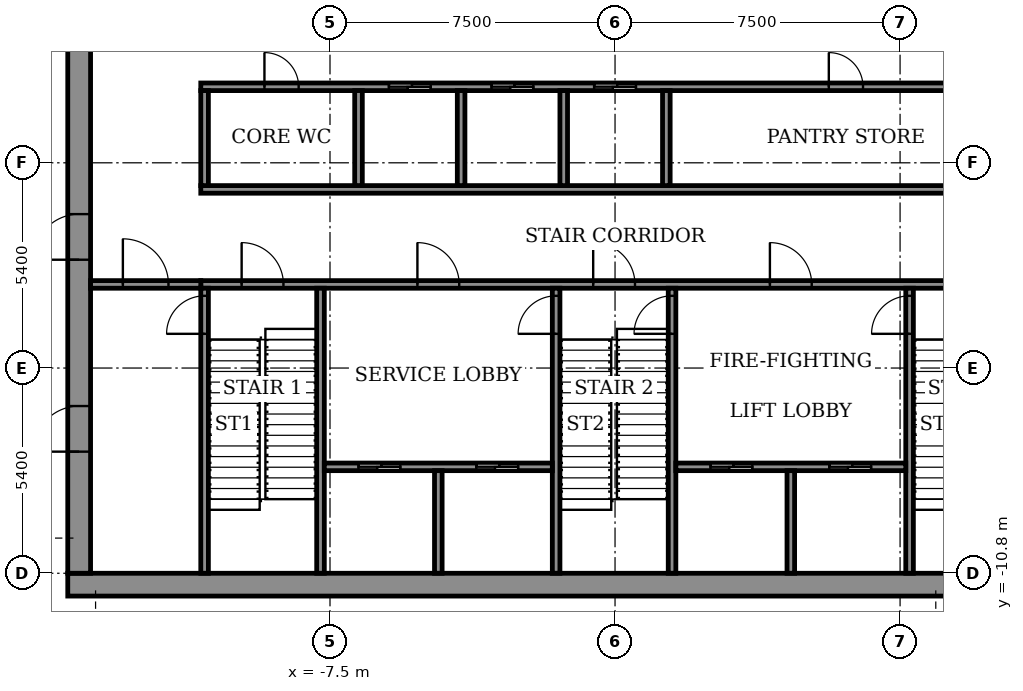
"""IFC4 building model, lengths in metres.
Left out: names, types, materials, properties, quantities, classifications, styles, units other than length and angle.
Written with IfcOpenShell. Run it as: python <this file> out.ifc"""

import sys

from ifc_helpers import new_model, si_unit, direction, frame, frame_2d, origin, place, context, subcontext, project, spatial, rectangle, extrude, element, fill, save


model = new_model("IFC4")
c1 = context("Model", 3, precision=1e-05, world=origin(), true_north=direction((0.0, 1.0)))
c2 = subcontext(c1, "Body", "Model", "MODEL_VIEW")
j1 = project(units=[si_unit("LENGTHUNIT", "METRE"), si_unit("PLANEANGLEUNIT", "RADIAN")], contexts=[c1])
p1 = place(None, origin())
s1 = spatial("IfcSite", under=j1, at=p1, CompositionType="ELEMENT")
p2 = place(p1, origin())
s2 = spatial("IfcBuilding", under=s1, at=p2, CompositionType="ELEMENT")
p3 = place(p2, frame((0.0, 0.0, 324.1)))
s3 = spatial("IfcBuildingStorey", under=s2, at=p3, CompositionType="ELEMENT", Elevation=324.1)
p4 = place(p3, frame((-14.4, -11.1, 0.0), z_axis=(0.0, 0.0, 1.0), x_axis=(1.0, 0.0, 0.0)))
e1 = element("IfcWall", 1, at=p4, inside=s3, PredefinedType="SHEAR", context=c2, shape_type="SweptSolid", body=[
    extrude(rectangle(XDim=28.8, YDim=0.6, at=frame_2d((14.4, 0.0))), origin(), (0.0, 0.0, 1.0), 5.6),
])
p5 = place(p3, frame((-14.1, -10.8, 0.0), z_axis=(0.0, 0.0, 1.0), x_axis=(0.0, 1.0, 0.0)))
e2 = element("IfcWall", 2, at=p5, inside=s3, PredefinedType="SHEAR", context=c2, shape_type="SweptSolid", body=[
    extrude(rectangle(XDim=21.6, YDim=0.6, at=frame_2d((10.8, 0.0))), origin(), (0.0, 0.0, 1.0), 5.6),
])
p6 = place(p5, frame((8.25, 0.0, 0.0)))
e3 = element("IfcOpeningElement", 3, at=p6, cuts=e2, PredefinedType="OPENING", context=c2, shape_type="SweptSolid", body=[
    extrude(rectangle(XDim=1.2, YDim=2.1, at=frame_2d((0.6, 1.05))), frame((0.0, 0.31, 0.0), z_axis=(0.0, -1.0, 0.0), x_axis=(1.0, 0.0, 0.0)), (0.0, 0.0, 1.0), 0.62),
])
p7 = place(p5, frame((15.25, 0.0, 0.0)))
e4 = element("IfcOpeningElement", 4, at=p7, cuts=e2, PredefinedType="OPENING", context=c2, shape_type="SweptSolid", body=[
    extrude(rectangle(XDim=1.2, YDim=2.1, at=frame_2d((0.6, 1.05))), frame((0.0, 0.31, 0.0), z_axis=(0.0, -1.0, 0.0), x_axis=(1.0, 0.0, 0.0)), (0.0, 0.0, 1.0), 0.62),
])
p8 = place(p5, frame((3.2, 0.0, 0.0)))
e5 = element("IfcOpeningElement", 5, at=p8, cuts=e2, PredefinedType="OPENING", context=c2, shape_type="SweptSolid", body=[
    extrude(rectangle(XDim=1.2, YDim=2.1, at=frame_2d((0.6, 1.05))), frame((0.0, 0.31, 0.0), z_axis=(0.0, -1.0, 0.0), x_axis=(1.0, 0.0, 0.0)), (0.0, 0.0, 1.0), 0.62),
])
p9 = place(p3, frame((-10.9, -3.2, 0.0), z_axis=(0.0, 0.0, 1.0), x_axis=(1.0, 0.0, 0.0)))
e6 = element("IfcWall", 6, at=p9, inside=s3, PredefinedType="SHEAR", context=c2, shape_type="SweptSolid", body=[
    extrude(rectangle(XDim=21.8, YDim=0.2, at=frame_2d((10.9, 0.0))), origin(), (0.0, 0.0, 1.0), 5.05),
])
p10 = place(p9, frame((1.075, 0.0, 0.0)))
e7 = element("IfcOpeningElement", 7, at=p10, cuts=e6, PredefinedType="OPENING", context=c2, shape_type="SweptSolid", body=[
    extrude(rectangle(XDim=1.1, YDim=2.1, at=frame_2d((0.55, 1.05))), frame((0.0, 0.11, 0.0), z_axis=(0.0, -1.0, 0.0), x_axis=(1.0, 0.0, 0.0)), (0.0, 0.0, 1.0), 0.22),
])
p11 = place(p9, frame((10.325, 0.0, 0.0)))
e8 = element("IfcOpeningElement", 8, at=p11, cuts=e6, PredefinedType="OPENING", context=c2, shape_type="SweptSolid", body=[
    extrude(rectangle(XDim=1.1, YDim=2.1, at=frame_2d((0.55, 1.05))), frame((0.0, 0.11, 0.0), z_axis=(0.0, -1.0, 0.0), x_axis=(1.0, 0.0, 0.0)), (0.0, 0.0, 1.0), 0.22),
])
p12 = place(p9, frame((19.625, 0.0, 0.0)))
e9 = element("IfcOpeningElement", 9, at=p12, cuts=e6, PredefinedType="OPENING", context=c2, shape_type="SweptSolid", body=[
    extrude(rectangle(XDim=1.1, YDim=2.1, at=frame_2d((0.55, 1.05))), frame((0.0, 0.11, 0.0), z_axis=(0.0, -1.0, 0.0), x_axis=(1.0, 0.0, 0.0)), (0.0, 0.0, 1.0), 0.22),
])
p13 = place(p9, frame((5.7, 0.0, 0.0)))
e10 = element("IfcOpeningElement", 10, at=p13, cuts=e6, PredefinedType="OPENING", context=c2, shape_type="SweptSolid", body=[
    extrude(rectangle(XDim=1.1, YDim=2.1, at=frame_2d((0.55, 1.05))), frame((0.0, 0.11, 0.0), z_axis=(0.0, -1.0, 0.0), x_axis=(1.0, 0.0, 0.0)), (0.0, 0.0, 1.0), 0.22),
])
p14 = place(p9, frame((14.975, 0.0, 0.0)))
e11 = element("IfcOpeningElement", 11, at=p14, cuts=e6, PredefinedType="OPENING", context=c2, shape_type="SweptSolid", body=[
    extrude(rectangle(XDim=1.1, YDim=2.1, at=frame_2d((0.55, 1.05))), frame((0.0, 0.11, 0.0), z_axis=(0.0, -1.0, 0.0), x_axis=(1.0, 0.0, 0.0)), (0.0, 0.0, 1.0), 0.22),
])
p15 = place(p3, frame((-10.9, -0.7, 0.0), z_axis=(0.0, 0.0, 1.0), x_axis=(1.0, 0.0, 0.0)))
e12 = element("IfcWall", 12, at=p15, inside=s3, PredefinedType="SHEAR", context=c2, shape_type="SweptSolid", body=[
    extrude(rectangle(XDim=21.8, YDim=0.2, at=frame_2d((10.9, 0.0))), origin(), (0.0, 0.0, 1.0), 5.05),
])
p16 = place(p3, frame((-10.9, 2.0, 0.0), z_axis=(0.0, 0.0, 1.0), x_axis=(1.0, 0.0, 0.0)))
e13 = element("IfcWall", 13, at=p16, inside=s3, PredefinedType="SHEAR", context=c2, shape_type="SweptSolid", body=[
    extrude(rectangle(XDim=21.8, YDim=0.2, at=frame_2d((10.9, 0.0))), origin(), (0.0, 0.0, 1.0), 5.05),
])
p17 = place(p16, frame((4.95, 0.0, 0.0)))
e14 = element("IfcOpeningElement", 14, at=p17, cuts=e13, PredefinedType="OPENING", context=c2, shape_type="SweptSolid", body=[
    extrude(rectangle(XDim=1.1, YDim=2.1, at=frame_2d((0.55, 1.05))), frame((0.0, 0.11, 0.0), z_axis=(0.0, -1.0, 0.0), x_axis=(1.0, 0.0, 0.0)), (0.0, 0.0, 1.0), 0.22),
])
p18 = place(p16, frame((7.65, 0.0, 0.0)))
e15 = element("IfcOpeningElement", 15, at=p18, cuts=e13, PredefinedType="OPENING", context=c2, shape_type="SweptSolid", body=[
    extrude(rectangle(XDim=1.1, YDim=2.1, at=frame_2d((0.55, 1.05))), frame((0.0, 0.11, 0.0), z_axis=(0.0, -1.0, 0.0), x_axis=(1.0, 0.0, 0.0)), (0.0, 0.0, 1.0), 0.22),
])
p19 = place(p16, frame((10.35, 0.0, 0.0)))
e16 = element("IfcOpeningElement", 16, at=p19, cuts=e13, PredefinedType="OPENING", context=c2, shape_type="SweptSolid", body=[
    extrude(rectangle(XDim=1.1, YDim=2.1, at=frame_2d((0.55, 1.05))), frame((0.0, 0.11, 0.0), z_axis=(0.0, -1.0, 0.0), x_axis=(1.0, 0.0, 0.0)), (0.0, 0.0, 1.0), 0.22),
])
p20 = place(p16, frame((1.675, 0.0, 0.0)))
e17 = element("IfcOpeningElement", 17, at=p20, cuts=e13, PredefinedType="OPENING", context=c2, shape_type="SweptSolid", body=[
    extrude(rectangle(XDim=0.9, YDim=2.1, at=frame_2d((0.45, 1.05))), frame((0.0, 0.11, 0.0), z_axis=(0.0, -1.0, 0.0), x_axis=(1.0, 0.0, 0.0)), (0.0, 0.0, 1.0), 0.22),
])
p21 = place(p16, frame((16.525, 0.0, 0.0)))
e18 = element("IfcOpeningElement", 18, at=p21, cuts=e13, PredefinedType="OPENING", context=c2, shape_type="SweptSolid", body=[
    extrude(rectangle(XDim=0.9, YDim=2.1, at=frame_2d((0.45, 1.05))), frame((0.0, 0.11, 0.0), z_axis=(0.0, -1.0, 0.0), x_axis=(1.0, 0.0, 0.0)), (0.0, 0.0, 1.0), 0.22),
])
p22 = place(p3, frame((-10.8, -10.8, 0.0), z_axis=(0.0, 0.0, 1.0), x_axis=(0.0, 1.0, 0.0)))
e19 = element("IfcWall", 19, at=p22, inside=s3, PredefinedType="SHEAR", context=c2, shape_type="SweptSolid", body=[
    extrude(rectangle(XDim=7.5, YDim=0.2, at=frame_2d((3.75, 0.0))), origin(), (0.0, 0.0, 1.0), 5.05),
])
p23 = place(p22, frame((6.3, 0.0, 0.0)))
e20 = element("IfcOpeningElement", 20, at=p23, cuts=e19, PredefinedType="OPENING", context=c2, shape_type="SweptSolid", body=[
    extrude(rectangle(XDim=1.0, YDim=2.1, at=frame_2d((0.5, 1.05))), frame((0.0, 0.11, 0.0), z_axis=(0.0, -1.0, 0.0), x_axis=(1.0, 0.0, 0.0)), (0.0, 0.0, 1.0), 0.22),
])
p24 = place(p3, frame((-7.75, -10.8, 0.0), z_axis=(0.0, 0.0, 1.0), x_axis=(0.0, 1.0, 0.0)))
e21 = element("IfcWall", 21, at=p24, inside=s3, PredefinedType="SHEAR", context=c2, shape_type="SweptSolid", body=[
    extrude(rectangle(XDim=7.5, YDim=0.2, at=frame_2d((3.75, 0.0))), origin(), (0.0, 0.0, 1.0), 5.05),
])
p25 = place(p3, frame((-1.55, -10.8, 0.0), z_axis=(0.0, 0.0, 1.0), x_axis=(0.0, 1.0, 0.0)))
e22 = element("IfcWall", 22, at=p25, inside=s3, PredefinedType="SHEAR", context=c2, shape_type="SweptSolid", body=[
    extrude(rectangle(XDim=7.5, YDim=0.2, at=frame_2d((3.75, 0.0))), origin(), (0.0, 0.0, 1.0), 5.05),
])
p26 = place(p25, frame((6.3, 0.0, 0.0)))
e23 = element("IfcOpeningElement", 23, at=p26, cuts=e22, PredefinedType="OPENING", context=c2, shape_type="SweptSolid", body=[
    extrude(rectangle(XDim=1.0, YDim=2.1, at=frame_2d((0.5, 1.05))), frame((0.0, 0.11, 0.0), z_axis=(0.0, -1.0, 0.0), x_axis=(1.0, 0.0, 0.0)), (0.0, 0.0, 1.0), 0.22),
])
p27 = place(p3, frame((1.5, -10.8, 0.0), z_axis=(0.0, 0.0, 1.0), x_axis=(0.0, 1.0, 0.0)))
e24 = element("IfcWall", 24, at=p27, inside=s3, PredefinedType="SHEAR", context=c2, shape_type="SweptSolid", body=[
    extrude(rectangle(XDim=7.5, YDim=0.2, at=frame_2d((3.75, 0.0))), origin(), (0.0, 0.0, 1.0), 5.05),
])
p28 = place(p27, frame((6.3, 0.0, 0.0)))
e25 = element("IfcOpeningElement", 25, at=p28, cuts=e24, PredefinedType="OPENING", context=c2, shape_type="SweptSolid", body=[
    extrude(rectangle(XDim=1.0, YDim=2.1, at=frame_2d((0.5, 1.05))), frame((0.0, 0.11, 0.0), z_axis=(0.0, -1.0, 0.0), x_axis=(1.0, 0.0, 0.0)), (0.0, 0.0, 1.0), 0.22),
])
p29 = place(p3, frame((7.75, -10.8, 0.0), z_axis=(0.0, 0.0, 1.0), x_axis=(0.0, 1.0, 0.0)))
e26 = element("IfcWall", 26, at=p29, inside=s3, PredefinedType="SHEAR", context=c2, shape_type="SweptSolid", body=[
    extrude(rectangle(XDim=7.5, YDim=0.2, at=frame_2d((3.75, 0.0))), origin(), (0.0, 0.0, 1.0), 5.05),
])
p30 = place(p29, frame((6.3, 0.0, 0.0)))
e27 = element("IfcOpeningElement", 27, at=p30, cuts=e26, PredefinedType="OPENING", context=c2, shape_type="SweptSolid", body=[
    extrude(rectangle(XDim=1.0, YDim=2.1, at=frame_2d((0.5, 1.05))), frame((0.0, 0.11, 0.0), z_axis=(0.0, -1.0, 0.0), x_axis=(1.0, 0.0, 0.0)), (0.0, 0.0, 1.0), 0.22),
])
p31 = place(p3, frame((-7.65, -8.0, 0.0), z_axis=(0.0, 0.0, 1.0), x_axis=(1.0, 0.0, 0.0)))
e28 = element("IfcWall", 28, at=p31, inside=s3, PredefinedType="SHEAR", context=c2, shape_type="SweptSolid", body=[
    extrude(rectangle(XDim=6.0, YDim=0.2, at=frame_2d((3.0, 0.0))), origin(), (0.0, 0.0, 1.0), 5.05),
])
p32 = place(p31, frame((0.9, 0.0, 0.0)))
e29 = element("IfcOpeningElement", 29, at=p32, cuts=e28, PredefinedType="OPENING", context=c2, shape_type="SweptSolid", body=[
    extrude(rectangle(XDim=1.1, YDim=2.1, at=frame_2d((0.55, 1.05))), frame((0.0, 0.11, 0.0), z_axis=(0.0, -1.0, 0.0), x_axis=(1.0, 0.0, 0.0)), (0.0, 0.0, 1.0), 0.22),
])
p33 = place(p31, frame((4.0, 0.0, 0.0)))
e30 = element("IfcOpeningElement", 30, at=p33, cuts=e28, PredefinedType="OPENING", context=c2, shape_type="SweptSolid", body=[
    extrude(rectangle(XDim=1.1, YDim=2.1, at=frame_2d((0.55, 1.05))), frame((0.0, 0.11, 0.0), z_axis=(0.0, -1.0, 0.0), x_axis=(1.0, 0.0, 0.0)), (0.0, 0.0, 1.0), 0.22),
])
p34 = place(p3, frame((-4.65, -10.8, 0.0), z_axis=(0.0, 0.0, 1.0), x_axis=(0.0, 1.0, 0.0)))
e31 = element("IfcWall", 31, at=p34, inside=s3, PredefinedType="SHEAR", context=c2, shape_type="SweptSolid", body=[
    extrude(rectangle(XDim=2.7, YDim=0.2, at=frame_2d((1.35, 0.0))), origin(), (0.0, 0.0, 1.0), 5.05),
])
p35 = place(p3, frame((1.6, -8.0, 0.0), z_axis=(0.0, 0.0, 1.0), x_axis=(1.0, 0.0, 0.0)))
e32 = element("IfcWall", 32, at=p35, inside=s3, PredefinedType="SHEAR", context=c2, shape_type="SweptSolid", body=[
    extrude(rectangle(XDim=6.05, YDim=0.2, at=frame_2d((3.025, 0.0))), origin(), (0.0, 0.0, 1.0), 5.05),
])
p36 = place(p35, frame((0.913, 0.0, 0.0)))
e33 = element("IfcOpeningElement", 33, at=p36, cuts=e32, PredefinedType="OPENING", context=c2, shape_type="SweptSolid", body=[
    extrude(rectangle(XDim=1.1, YDim=2.1, at=frame_2d((0.55, 1.05))), frame((0.0, 0.11, 0.0), z_axis=(0.0, -1.0, 0.0), x_axis=(1.0, 0.0, 0.0)), (0.0, 0.0, 1.0), 0.22),
])
p37 = place(p35, frame((4.038, 0.0, 0.0)))
e34 = element("IfcOpeningElement", 34, at=p37, cuts=e32, PredefinedType="OPENING", context=c2, shape_type="SweptSolid", body=[
    extrude(rectangle(XDim=1.1, YDim=2.1, at=frame_2d((0.55, 1.05))), frame((0.0, 0.11, 0.0), z_axis=(0.0, -1.0, 0.0), x_axis=(1.0, 0.0, 0.0)), (0.0, 0.0, 1.0), 0.22),
])
p38 = place(p3, frame((4.625, -10.8, 0.0), z_axis=(0.0, 0.0, 1.0), x_axis=(0.0, 1.0, 0.0)))
e35 = element("IfcWall", 35, at=p38, inside=s3, PredefinedType="SHEAR", context=c2, shape_type="SweptSolid", body=[
    extrude(rectangle(XDim=2.7, YDim=0.2, at=frame_2d((1.35, 0.0))), origin(), (0.0, 0.0, 1.0), 5.05),
])
p39 = place(p3, frame((-10.8, -0.6, 0.0), z_axis=(0.0, 0.0, 1.0), x_axis=(0.0, 1.0, 0.0)))
e36 = element("IfcWall", 36, at=p39, inside=s3, PredefinedType="STANDARD", context=c2, shape_type="SweptSolid", body=[
    extrude(rectangle(XDim=2.5, YDim=0.2, at=frame_2d((1.25, 0.0))), origin(), (0.0, 0.0, 1.0), 5.05),
])
for number, where, z_axis, x_axis in (
    (37, (-6.75, -0.6, 0.0), (0.0, 0.0, 1.0), (0.0, 1.0, 0.0)),
    (38, (-4.05, -0.6, 0.0), (0.0, 0.0, 1.0), (0.0, 1.0, 0.0)),
    (39, (-1.35, -0.6, 0.0), (0.0, 0.0, 1.0), (0.0, 1.0, 0.0)),
    (40, (1.35, -0.6, 0.0), (0.0, 0.0, 1.0), (0.0, 1.0, 0.0)),
):
    element("IfcWall", number, at=place(p3, frame(where, z_axis=z_axis, x_axis=x_axis)), inside=s3, PredefinedType="SHEAR", context=c2, shape_type="SweptSolid", body=[
        extrude(rectangle(XDim=2.5, YDim=0.2, at=frame_2d((1.25, 0.0))), origin(), (0.0, 0.0, 1.0), 5.05),
    ])
p40 = place(p3, frame((-13.8, -3.2, 0.0), z_axis=(0.0, 0.0, 1.0), x_axis=(1.0, 0.0, 0.0)))
e41 = element("IfcWall", 41, at=p40, inside=s3, PredefinedType="STANDARD", context=c2, shape_type="SweptSolid", body=[
    extrude(rectangle(XDim=2.9, YDim=0.2, at=frame_2d((1.45, 0.0))), origin(), (0.0, 0.0, 1.0), 5.05),
])
p41 = place(p40, frame((0.85, 0.0, 0.0)))
e42 = element("IfcOpeningElement", 42, at=p41, cuts=e41, PredefinedType="OPENING", context=c2, shape_type="SweptSolid", body=[
    extrude(rectangle(XDim=1.2, YDim=2.1, at=frame_2d((0.6, 1.05))), frame((0.0, 0.11, 0.0), z_axis=(0.0, -1.0, 0.0), x_axis=(1.0, 0.0, 0.0)), (0.0, 0.0, 1.0), 0.22),
])
p42 = place(p6, origin())
e43 = element("IfcDoor", 43, at=p42, inside=s3, OperationType="DOUBLE_DOOR_SINGLE_SWING", PredefinedType="DOOR", context=c2, shape_type="SweptSolid", body=[
    extrude(rectangle(XDim=1.2, YDim=2.1, at=frame_2d((0.6, 1.05))), frame((0.0, 0.025, 0.0), z_axis=(0.0, -1.0, 0.0), x_axis=(1.0, 0.0, 0.0)), (0.0, 0.0, 1.0), 0.05),
])
fill(e3, e43)
p43 = place(p8, origin())
e44 = element("IfcDoor", 44, at=p43, inside=s3, OperationType="DOUBLE_DOOR_SINGLE_SWING", PredefinedType="DOOR", context=c2, shape_type="SweptSolid", body=[
    extrude(rectangle(XDim=1.2, YDim=2.1, at=frame_2d((0.6, 1.05))), frame((0.0, 0.025, 0.0), z_axis=(0.0, -1.0, 0.0), x_axis=(1.0, 0.0, 0.0)), (0.0, 0.0, 1.0), 0.05),
])
fill(e5, e44)
p44 = place(p17, origin())
e45 = element("IfcDoor", 45, at=p44, inside=s3, OperationType="SLIDING_TO_LEFT", PredefinedType="DOOR", context=c2, shape_type="SweptSolid", body=[
    extrude(rectangle(XDim=1.1, YDim=2.1, at=frame_2d((0.55, 1.05))), frame((0.0, 0.025, 0.0), z_axis=(0.0, -1.0, 0.0), x_axis=(1.0, 0.0, 0.0)), (0.0, 0.0, 1.0), 0.05),
])
fill(e14, e45)
p45 = place(p18, origin())
e46 = element("IfcDoor", 46, at=p45, inside=s3, OperationType="SLIDING_TO_LEFT", PredefinedType="DOOR", context=c2, shape_type="SweptSolid", body=[
    extrude(rectangle(XDim=1.1, YDim=2.1, at=frame_2d((0.55, 1.05))), frame((0.0, 0.025, 0.0), z_axis=(0.0, -1.0, 0.0), x_axis=(1.0, 0.0, 0.0)), (0.0, 0.0, 1.0), 0.05),
])
fill(e15, e46)
p46 = place(p19, origin())
e47 = element("IfcDoor", 47, at=p46, inside=s3, OperationType="SLIDING_TO_LEFT", PredefinedType="DOOR", context=c2, shape_type="SweptSolid", body=[
    extrude(rectangle(XDim=1.1, YDim=2.1, at=frame_2d((0.55, 1.05))), frame((0.0, 0.025, 0.0), z_axis=(0.0, -1.0, 0.0), x_axis=(1.0, 0.0, 0.0)), (0.0, 0.0, 1.0), 0.05),
])
fill(e16, e47)
p47 = place(p20, origin())
e48 = element("IfcDoor", 48, at=p47, inside=s3, OperationType="SINGLE_SWING_RIGHT", PredefinedType="DOOR", context=c2, shape_type="SweptSolid", body=[
    extrude(rectangle(XDim=0.9, YDim=2.1, at=frame_2d((0.45, 1.05))), frame((0.0, 0.025, 0.0), z_axis=(0.0, -1.0, 0.0), x_axis=(1.0, 0.0, 0.0)), (0.0, 0.0, 1.0), 0.05),
])
fill(e17, e48)
p48 = place(p21, origin())
e49 = element("IfcDoor", 49, at=p48, inside=s3, OperationType="SINGLE_SWING_RIGHT", PredefinedType="DOOR", context=c2, shape_type="SweptSolid", body=[
    extrude(rectangle(XDim=0.9, YDim=2.1, at=frame_2d((0.45, 1.05))), frame((0.0, 0.025, 0.0), z_axis=(0.0, -1.0, 0.0), x_axis=(1.0, 0.0, 0.0)), (0.0, 0.0, 1.0), 0.05),
])
fill(e18, e49)
p49 = place(p36, origin())
e50 = element("IfcDoor", 50, at=p49, inside=s3, OperationType="SLIDING_TO_LEFT", PredefinedType="DOOR", context=c2, shape_type="SweptSolid", body=[
    extrude(rectangle(XDim=1.1, YDim=2.1, at=frame_2d((0.55, 1.05))), frame((0.0, 0.025, 0.0), z_axis=(0.0, -1.0, 0.0), x_axis=(1.0, 0.0, 0.0)), (0.0, 0.0, 1.0), 0.05),
])
fill(e33, e50)
p50 = place(p32, origin())
e51 = element("IfcDoor", 51, at=p50, inside=s3, OperationType="SLIDING_TO_LEFT", PredefinedType="DOOR", context=c2, shape_type="SweptSolid", body=[
    extrude(rectangle(XDim=1.1, YDim=2.1, at=frame_2d((0.55, 1.05))), frame((0.0, 0.025, 0.0), z_axis=(0.0, -1.0, 0.0), x_axis=(1.0, 0.0, 0.0)), (0.0, 0.0, 1.0), 0.05),
])
fill(e29, e51)
p51 = place(p37, origin())
e52 = element("IfcDoor", 52, at=p51, inside=s3, OperationType="SLIDING_TO_LEFT", PredefinedType="DOOR", context=c2, shape_type="SweptSolid", body=[
    extrude(rectangle(XDim=1.1, YDim=2.1, at=frame_2d((0.55, 1.05))), frame((0.0, 0.025, 0.0), z_axis=(0.0, -1.0, 0.0), x_axis=(1.0, 0.0, 0.0)), (0.0, 0.0, 1.0), 0.05),
])
fill(e34, e52)
p52 = place(p33, origin())
e53 = element("IfcDoor", 53, at=p52, inside=s3, OperationType="SLIDING_TO_LEFT", PredefinedType="DOOR", context=c2, shape_type="SweptSolid", body=[
    extrude(rectangle(XDim=1.1, YDim=2.1, at=frame_2d((0.55, 1.05))), frame((0.0, 0.025, 0.0), z_axis=(0.0, -1.0, 0.0), x_axis=(1.0, 0.0, 0.0)), (0.0, 0.0, 1.0), 0.05),
])
fill(e30, e53)
p53 = place(p10, origin())
e54 = element("IfcDoor", 54, at=p53, inside=s3, OperationType="SINGLE_SWING_RIGHT", PredefinedType="DOOR", context=c2, shape_type="SweptSolid", body=[
    extrude(rectangle(XDim=1.1, YDim=2.1, at=frame_2d((0.55, 1.05))), frame((0.0, 0.025, 0.0), z_axis=(0.0, -1.0, 0.0), x_axis=(1.0, 0.0, 0.0)), (0.0, 0.0, 1.0), 0.05),
])
fill(e7, e54)
p54 = place(p11, origin())
e55 = element("IfcDoor", 55, at=p54, inside=s3, OperationType="SINGLE_SWING_RIGHT", PredefinedType="DOOR", context=c2, shape_type="SweptSolid", body=[
    extrude(rectangle(XDim=1.1, YDim=2.1, at=frame_2d((0.55, 1.05))), frame((0.0, 0.025, 0.0), z_axis=(0.0, -1.0, 0.0), x_axis=(1.0, 0.0, 0.0)), (0.0, 0.0, 1.0), 0.05),
])
fill(e8, e55)
p55 = place(p13, origin())
e56 = element("IfcDoor", 56, at=p55, inside=s3, OperationType="SINGLE_SWING_LEFT", PredefinedType="DOOR", context=c2, shape_type="SweptSolid", body=[
    extrude(rectangle(XDim=1.1, YDim=2.1, at=frame_2d((0.55, 1.05))), frame((0.0, 0.025, 0.0), z_axis=(0.0, -1.0, 0.0), x_axis=(1.0, 0.0, 0.0)), (0.0, 0.0, 1.0), 0.05),
])
fill(e10, e56)
p56 = place(p14, origin())
e57 = element("IfcDoor", 57, at=p56, inside=s3, OperationType="SINGLE_SWING_LEFT", PredefinedType="DOOR", context=c2, shape_type="SweptSolid", body=[
    extrude(rectangle(XDim=1.1, YDim=2.1, at=frame_2d((0.55, 1.05))), frame((0.0, 0.025, 0.0), z_axis=(0.0, -1.0, 0.0), x_axis=(1.0, 0.0, 0.0)), (0.0, 0.0, 1.0), 0.05),
])
fill(e11, e57)
p57 = place(p26, origin())
e58 = element("IfcDoor", 58, at=p57, inside=s3, OperationType="SINGLE_SWING_RIGHT", PredefinedType="DOOR", context=c2, shape_type="SweptSolid", body=[
    extrude(rectangle(XDim=1.0, YDim=2.1, at=frame_2d((0.5, 1.05))), frame((0.0, 0.025, 0.0), z_axis=(0.0, -1.0, 0.0), x_axis=(1.0, 0.0, 0.0)), (0.0, 0.0, 1.0), 0.05),
])
fill(e23, e58)
p58 = place(p28, origin())
e59 = element("IfcDoor", 59, at=p58, inside=s3, OperationType="SINGLE_SWING_RIGHT", PredefinedType="DOOR", context=c2, shape_type="SweptSolid", body=[
    extrude(rectangle(XDim=1.0, YDim=2.1, at=frame_2d((0.5, 1.05))), frame((0.0, 0.025, 0.0), z_axis=(0.0, -1.0, 0.0), x_axis=(1.0, 0.0, 0.0)), (0.0, 0.0, 1.0), 0.05),
])
fill(e25, e59)
p59 = place(p30, origin())
e60 = element("IfcDoor", 60, at=p59, inside=s3, OperationType="SINGLE_SWING_RIGHT", PredefinedType="DOOR", context=c2, shape_type="SweptSolid", body=[
    extrude(rectangle(XDim=1.0, YDim=2.1, at=frame_2d((0.5, 1.05))), frame((0.0, 0.025, 0.0), z_axis=(0.0, -1.0, 0.0), x_axis=(1.0, 0.0, 0.0)), (0.0, 0.0, 1.0), 0.05),
])
fill(e27, e60)
p60 = place(p41, origin())
e61 = element("IfcDoor", 61, at=p60, inside=s3, OperationType="SINGLE_SWING_LEFT", PredefinedType="DOOR", context=c2, shape_type="SweptSolid", body=[
    extrude(rectangle(XDim=1.2, YDim=2.1, at=frame_2d((0.6, 1.05))), frame((0.0, 0.025, 0.0), z_axis=(0.0, -1.0, 0.0), x_axis=(1.0, 0.0, 0.0)), (0.0, 0.0, 1.0), 0.05),
])
fill(e42, e61)
p61 = place(p23, origin())
e62 = element("IfcDoor", 62, at=p61, inside=s3, OperationType="SINGLE_SWING_RIGHT", PredefinedType="DOOR", context=c2, shape_type="SweptSolid", body=[
    extrude(rectangle(XDim=1.0, YDim=2.1, at=frame_2d((0.5, 1.05))), frame((0.0, 0.025, 0.0), z_axis=(0.0, -1.0, 0.0), x_axis=(1.0, 0.0, 0.0)), (0.0, 0.0, 1.0), 0.05),
])
fill(e20, e62)
save(model, sys.argv[1])
